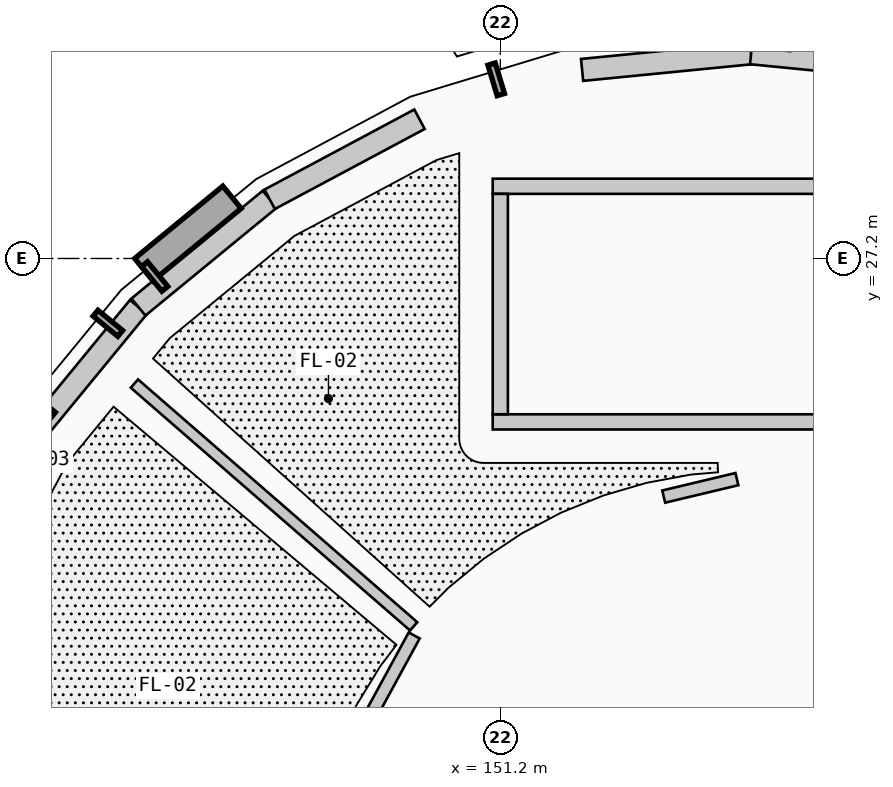
"""IFC4 building model, lengths in metres.
Left out: names, types, materials, properties, quantities, classifications, styles, units other than length and angle.
Written with IfcOpenShell. Run it as: python <this file> out.ifc"""

import sys

from ifc_helpers import new_model, si_unit, direction, frame, frame_2d, origin, origin_2d, place, context, subcontext, project, spatial, rectangle, circle, extrude, element, fill, save


model = new_model("IFC4")
c1 = context("Model", 3, precision=1e-05, world=origin(), true_north=direction((0.0, 1.0)))
c2 = subcontext(c1, "Body", "Model", "MODEL_VIEW")
j1 = project(units=[si_unit("LENGTHUNIT", "METRE"), si_unit("PLANEANGLEUNIT", "RADIAN")], contexts=[c1])
p1 = place(None, origin())
s1 = spatial("IfcSite", under=j1, at=p1, CompositionType="ELEMENT")
p2 = place(p1, origin())
s2 = spatial("IfcBuilding", under=s1, at=p2, CompositionType="ELEMENT")
p3 = place(p2, frame((0.0, 0.0, 4.55)))
s3 = spatial("IfcBuildingStorey", under=s2, at=p3, CompositionType="ELEMENT", Elevation=4.55)
for number, where, z_axis, x_axis in (
    (1, (154.5, 29.38, 0.0), (0.0, 0.0, 1.0), (1.0, 0.0, 0.0)),
    (2, (150.336, 28.552, 0.0), (0.0, 0.0, 1.0), (1.0, 0.0, 0.0)),
    (3, (146.807, 26.193, 0.0), (0.0, 0.0, 1.0), (1.0, 0.0, 0.0)),
    (4, (150.399, 22.601, 0.0), (0.0, 0.0, 1.0), (1.0, 0.0, 0.0)),
):
    element("IfcColumn", number, at=place(p3, frame(where, z_axis=z_axis, x_axis=x_axis)), inside=s3, PredefinedType="COLUMN", context=c2, shape_type="SweptSolid", body=[
        extrude(rectangle(XDim=0.365, YDim=0.365, at=origin_2d()), origin(), (0.0, 0.0, 1.0), 4.2),
    ])
p4 = place(p3, frame((151.056, 29.544, 0.0), z_axis=(0.0, 0.0, 1.0), x_axis=(1.0, 0.0, 0.0)))
e5 = element("IfcColumn", 5, at=p4, inside=s3, PredefinedType="PILASTER", context=c2, shape_type="SweptSolid", body=[
    extrude(circle(Radius=0.19, at=origin_2d()), origin(), (0.0, 0.0, 1.0), 4.2),
])
p5 = place(p3, frame((145.021, 24.834, 0.0), z_axis=(0.0, 0.0, 1.0), x_axis=(0.63455767339, 0.772875513354, 0.0)))
e6 = element("IfcWall", 6, at=p5, inside=s3, PredefinedType="ELEMENTEDWALL", context=c2, shape_type="SweptSolid", body=[
    extrude(rectangle(XDim=2.235, YDim=0.29, at=frame_2d((1.117, 0.0))), origin(), (0.0, 0.0, 1.0), 3.309),
])
p6 = place(p5, frame((0.667, 0.0, 0.85)))
e7 = element("IfcOpeningElement", 7, at=p6, cuts=e6, PredefinedType="OPENING", context=c2, shape_type="SweptSolid", body=[
    extrude(rectangle(XDim=0.9, YDim=1.65, at=frame_2d((0.45, 0.825))), frame((0.0, 0.155, 0.0), z_axis=(0.0, -1.0, 0.0), x_axis=(1.0, 0.0, 0.0)), (0.0, 0.0, 1.0), 0.31),
])
p7 = place(p3, frame((146.439, 26.561, 0.0), z_axis=(0.0, 0.0, 1.0), x_axis=(0.772875513354, 0.63455767339, 0.0)))
e8 = element("IfcWall", 8, at=p7, inside=s3, PredefinedType="ELEMENTEDWALL", context=c2, shape_type="SweptSolid", body=[
    extrude(rectangle(XDim=2.235, YDim=0.29, at=frame_2d((1.117, 0.0))), origin(), (0.0, 0.0, 1.0), 3.309),
])
p8 = place(p7, frame((0.667, 0.0, 0.85)))
e9 = element("IfcOpeningElement", 9, at=p8, cuts=e8, PredefinedType="OPENING", context=c2, shape_type="SweptSolid", body=[
    extrude(rectangle(XDim=0.9, YDim=1.9, at=frame_2d((0.45, 0.95))), frame((0.0, 0.155, 0.0), z_axis=(0.0, -1.0, 0.0), x_axis=(1.0, 0.0, 0.0)), (0.0, 0.0, 1.0), 0.31),
])
p9 = place(p3, frame((148.166, 27.979, 0.0), z_axis=(0.0, 0.0, 1.0), x_axis=(0.882017012185, 0.471217561446, 0.0)))
e10 = element("IfcWall", 10, at=p9, inside=s3, PredefinedType="ELEMENTEDWALL", context=c2, shape_type="SweptSolid", body=[
    extrude(rectangle(XDim=2.235, YDim=0.29, at=frame_2d((1.117, 0.0))), origin(), (0.0, 0.0, 1.0), 3.309),
])
p10 = place(p9, frame((0.657, 0.0, 0.85)))
e11 = element("IfcOpeningElement", 11, at=p10, cuts=e10, PredefinedType="OPENING", context=c2, shape_type="SweptSolid", body=[
    extrude(rectangle(XDim=0.92, YDim=1.55, at=frame_2d((0.46, 0.775))), frame((0.0, 0.155, 0.0), z_axis=(0.0, -1.0, 0.0), x_axis=(1.0, 0.0, 0.0)), (0.0, 0.0, 1.0), 0.31),
])
for number, where, z_axis, x_axis in (
    (12, (152.276, 29.681, 0.0), (0.0, 0.0, 1.0), (0.995, 0.098, 0.0)),
    (13, (154.5, 29.9, 0.0), (0.0, 0.0, 1.0), (0.995, -0.098, 0.0)),
):
    element("IfcWall", number, at=place(p3, frame(where, z_axis=z_axis, x_axis=x_axis)), inside=s3, PredefinedType="ELEMENTEDWALL", context=c2, shape_type="SweptSolid", body=[
        extrude(rectangle(XDim=2.235, YDim=0.29, at=frame_2d((1.117, 0.0))), origin(), (0.0, 0.0, 1.0), 3.309),
    ])
p11 = place(p3, frame((151.1, 25.05, 0.0), z_axis=(0.0, 0.0, 1.0), x_axis=(1.0, 0.0, 0.0)))
e14 = element("IfcWall", 14, at=p11, inside=s3, PredefinedType="SHEAR", context=c2, shape_type="SweptSolid", body=[
    extrude(rectangle(XDim=6.8, YDim=0.2, at=frame_2d((3.4, 0.0))), origin(), (0.0, 0.0, 1.0), 3.955),
])
p12 = place(p11, frame((0.38, 0.0, 0.0)))
e15 = element("IfcOpeningElement", 15, at=p12, cuts=e14, PredefinedType="OPENING", context=c2, shape_type="SweptSolid", body=[
    extrude(rectangle(XDim=1.05, YDim=2.15, at=frame_2d((0.525, 1.075))), frame((0.0, 0.11, 0.0), z_axis=(0.0, -1.0, 0.0), x_axis=(1.0, 0.0, 0.0)), (0.0, 0.0, 1.0), 0.22),
])
p13 = place(p3, frame((151.1, 28.15, 0.0), z_axis=(0.0, 0.0, 1.0), x_axis=(1.0, 0.0, 0.0)))
e16 = element("IfcWall", 16, at=p13, inside=s3, PredefinedType="SHEAR", context=c2, shape_type="SweptSolid", body=[
    extrude(rectangle(XDim=6.8, YDim=0.2, at=frame_2d((3.4, 0.0))), origin(), (0.0, 0.0, 1.0), 3.955),
])
p14 = place(p3, frame((151.2, 25.15, 0.0), z_axis=(0.0, 0.0, 1.0), x_axis=(0.0, 1.0, 0.0)))
e17 = element("IfcWall", 17, at=p14, inside=s3, PredefinedType="SHEAR", context=c2, shape_type="SweptSolid", body=[
    extrude(rectangle(XDim=2.9, YDim=0.2, at=frame_2d((1.45, 0.0))), origin(), (0.0, 0.0, 1.0), 3.955),
])
p15 = place(p3, frame((150.06, 22.36, 0.0), z_axis=(0.0, 0.0, 1.0), x_axis=(-0.754707000712, 0.656061996366, 0.0)))
e18 = element("IfcWall", 18, at=p15, inside=s3, PredefinedType="PARTITIONING", context=c2, shape_type="SweptSolid", body=[
    extrude(rectangle(XDim=4.868, YDim=0.145, at=frame_2d((2.434, 0.0))), origin(), (0.0, 0.0, 1.0), 3.284),
])
p16 = place(p3, frame((154.313, 24.297, 0.0), z_axis=(0.0, 0.0, 1.0), x_axis=(-0.972586166784, -0.232542787849, 0.0)))
e19 = element("IfcWall", 19, at=p16, inside=s3, PredefinedType="PARTITIONING", context=c2, shape_type="SweptSolid", body=[
    extrude(rectangle(XDim=0.99, YDim=0.165, at=frame_2d((0.495, 0.0))), origin(), (0.0, 0.0, 1.0), 3.284),
])
p17 = place(p3, frame((150.067, 22.24, 0.0), z_axis=(0.0, 0.0, 1.0), x_axis=(-0.478565523384, -0.878051843474, 0.0)))
e20 = element("IfcWall", 20, at=p17, inside=s3, PredefinedType="PARTITIONING", context=c2, shape_type="SweptSolid", body=[
    extrude(rectangle(XDim=2.328, YDim=0.165, at=frame_2d((1.164, 0.0))), origin(), (0.0, 0.0, 1.0), 3.284),
])
p18 = place(p17, frame((0.579, 0.0, 0.0)))
e21 = element("IfcOpeningElement", 21, at=p18, cuts=e20, PredefinedType="OPENING", context=c2, shape_type="SweptSolid", body=[
    extrude(rectangle(XDim=1.17, YDim=2.24, at=frame_2d((0.585, 1.12))), frame((0.0, 0.093, 0.0), z_axis=(0.0, -1.0, 0.0), x_axis=(1.0, 0.0, 0.0)), (0.0, 0.0, 1.0), 0.185),
])
p19 = place(p6, origin())
e22 = element("IfcWindow", 22, at=p19, inside=s3, PartitioningType="SINGLE_PANEL", PredefinedType="WINDOW", context=c2, shape_type="SweptSolid", body=[
    extrude(rectangle(XDim=0.9, YDim=1.65, at=frame_2d((0.45, 0.825))), frame((0.0, 0.03, 0.0), z_axis=(0.0, -1.0, 0.0), x_axis=(1.0, 0.0, 0.0)), (0.0, 0.0, 1.0), 0.06),
])
fill(e7, e22)
p20 = place(p8, origin())
e23 = element("IfcWindow", 23, at=p20, inside=s3, PartitioningType="SINGLE_PANEL", PredefinedType="WINDOW", context=c2, shape_type="SweptSolid", body=[
    extrude(rectangle(XDim=0.9, YDim=1.9, at=frame_2d((0.45, 0.95))), frame((0.0, 0.03, 0.0), z_axis=(0.0, -1.0, 0.0), x_axis=(1.0, 0.0, 0.0)), (0.0, 0.0, 1.0), 0.06),
])
fill(e9, e23)
p21 = place(p10, origin())
e24 = element("IfcWindow", 24, at=p21, inside=s3, PartitioningType="SINGLE_PANEL", PredefinedType="WINDOW", context=c2, shape_type="SweptSolid", body=[
    extrude(rectangle(XDim=0.92, YDim=1.55, at=frame_2d((0.46, 0.775))), frame((0.0, 0.03, 0.0), z_axis=(0.0, -1.0, 0.0), x_axis=(1.0, 0.0, 0.0)), (0.0, 0.0, 1.0), 0.06),
])
fill(e11, e24)
p22 = place(p12, origin())
e25 = element("IfcDoor", 25, at=p22, inside=s3, OperationType="SINGLE_SWING_LEFT", PredefinedType="DOOR", context=c2, shape_type="SweptSolid", body=[
    extrude(rectangle(XDim=1.05, YDim=2.15, at=frame_2d((0.525, 1.075))), frame((0.0, 0.025, 0.0), z_axis=(0.0, -1.0, 0.0), x_axis=(1.0, 0.0, 0.0)), (0.0, 0.0, 1.0), 0.05),
])
fill(e15, e25)
p23 = place(p18, origin())
e26 = element("IfcDoor", 26, at=p23, inside=s3, OperationType="SINGLE_SWING_RIGHT", PredefinedType="DOOR", context=c2, shape_type="SweptSolid", body=[
    extrude(rectangle(XDim=1.17, YDim=2.24, at=frame_2d((0.585, 1.12))), frame((0.0, 0.025, 0.0), z_axis=(0.0, -1.0, 0.0), x_axis=(1.0, 0.0, 0.0)), (0.0, 0.0, 1.0), 0.05),
])
fill(e21, e26)
save(model, sys.argv[1])
